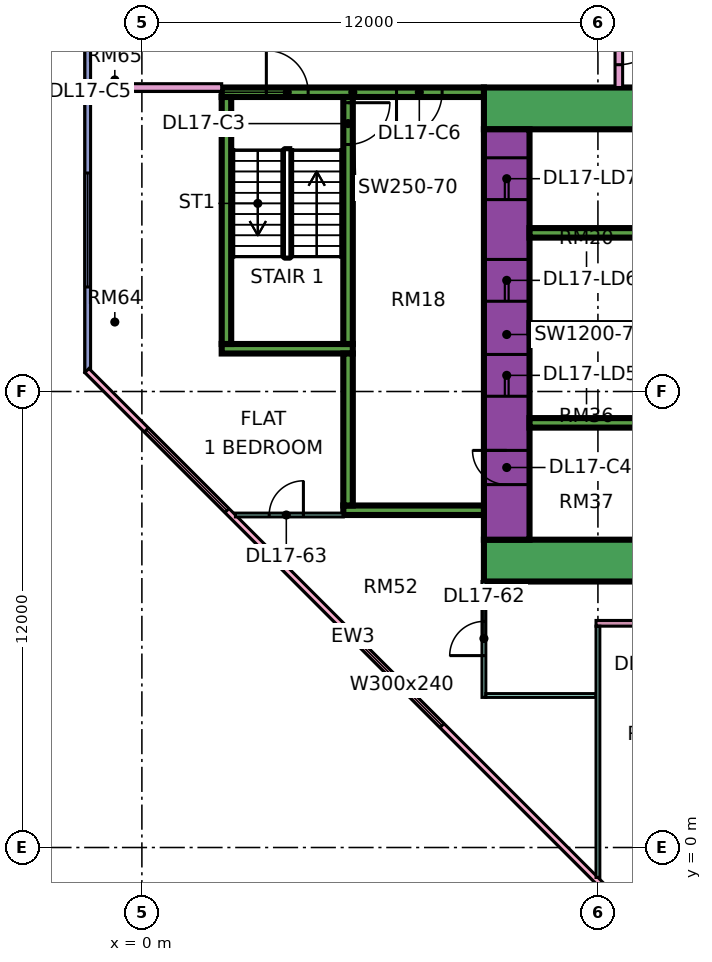
"""IFC4 building model, lengths in metres.
Left out: names, types, materials, properties, quantities, classifications, styles, units other than length and angle.
Written with IfcOpenShell. Run it as: python <this file> out.ifc"""

import sys

from ifc_helpers import new_model, si_unit, direction, frame, frame_2d, origin, place, context, subcontext, project, spatial, rectangle, extrude, element, fill, save


model = new_model("IFC4")
c1 = context("Model", 3, precision=1e-05, world=origin(), true_north=direction((0.0, 1.0)))
c2 = subcontext(c1, "Body", "Model", "MODEL_VIEW")
j1 = project(units=[si_unit("LENGTHUNIT", "METRE"), si_unit("PLANEANGLEUNIT", "RADIAN")], contexts=[c1])
p1 = place(None, origin())
s1 = spatial("IfcSite", under=j1, at=p1, CompositionType="ELEMENT")
p2 = place(p1, origin())
s2 = spatial("IfcBuilding", under=s1, at=p2, CompositionType="ELEMENT")
p3 = place(p2, frame((0.0, 0.0, 78.9)))
s3 = spatial("IfcBuildingStorey", under=s2, at=p3, CompositionType="ELEMENT", Elevation=78.9)
p4 = place(p3, frame((9.0, 7.55, 0.0), z_axis=(0.0, 0.0, 1.0), x_axis=(1.0, 0.0, 0.0)))
e1 = element("IfcWall", 1, at=p4, inside=s3, PredefinedType="SHEAR", context=c2, shape_type="SweptSolid", body=[
    extrude(rectangle(XDim=25.0, YDim=1.1, at=frame_2d((12.5, 0.0))), origin(), (0.0, 0.0, 1.0), 3.75),
])
p5 = place(p3, frame((9.0, 19.45, 0.0), z_axis=(0.0, 0.0, 1.0), x_axis=(1.0, 0.0, 0.0)))
e2 = element("IfcWall", 2, at=p5, inside=s3, PredefinedType="SHEAR", context=c2, shape_type="SweptSolid", body=[
    extrude(rectangle(XDim=25.0, YDim=1.1, at=frame_2d((12.5, 0.0))), origin(), (0.0, 0.0, 1.0), 3.75),
])
p6 = place(p5, frame((19.1, 0.0, 0.0)))
e3 = element("IfcOpeningElement", 3, at=p6, cuts=e2, PredefinedType="OPENING", context=c2, shape_type="SweptSolid", body=[
    extrude(rectangle(XDim=1.8, YDim=2.4, at=frame_2d((0.9, 1.2))), frame((0.0, 0.56, 0.0), z_axis=(0.0, -1.0, 0.0), x_axis=(1.0, 0.0, 0.0)), (0.0, 0.0, 1.0), 1.12),
])
p7 = place(p3, frame((9.6, 8.1, 0.0), z_axis=(0.0, 0.0, 1.0), x_axis=(0.0, 1.0, 0.0)))
e4 = element("IfcWall", 4, at=p7, inside=s3, PredefinedType="SHEAR", context=c2, shape_type="SweptSolid", body=[
    extrude(rectangle(XDim=10.8, YDim=1.2, at=frame_2d((5.4, 0.0))), origin(), (0.0, 0.0, 1.0), 3.75),
])
p8 = place(p7, frame((3.775, 0.0, 0.0)))
e5 = element("IfcOpeningElement", 5, at=p8, cuts=e4, PredefinedType="OPENING", context=c2, shape_type="SweptSolid", body=[
    extrude(rectangle(XDim=1.1, YDim=2.2, at=frame_2d((0.55, 1.1))), frame((0.0, 0.61, 0.0), z_axis=(0.0, -1.0, 0.0), x_axis=(1.0, 0.0, 0.0)), (0.0, 0.0, 1.0), 1.22),
])
p9 = place(p7, frame((6.275, 0.0, 0.0)))
e6 = element("IfcOpeningElement", 6, at=p9, cuts=e4, PredefinedType="OPENING", context=c2, shape_type="SweptSolid", body=[
    extrude(rectangle(XDim=1.1, YDim=2.2, at=frame_2d((0.55, 1.1))), frame((0.0, 0.61, 0.0), z_axis=(0.0, -1.0, 0.0), x_axis=(1.0, 0.0, 0.0)), (0.0, 0.0, 1.0), 1.22),
])
p10 = place(p7, frame((8.95, 0.0, 0.0)))
e7 = element("IfcOpeningElement", 7, at=p10, cuts=e4, PredefinedType="OPENING", context=c2, shape_type="SweptSolid", body=[
    extrude(rectangle(XDim=1.1, YDim=2.2, at=frame_2d((0.55, 1.1))), frame((0.0, 0.61, 0.0), z_axis=(0.0, -1.0, 0.0), x_axis=(1.0, 0.0, 0.0)), (0.0, 0.0, 1.0), 1.22),
])
p11 = place(p7, frame((1.45, 0.0, 0.0)))
e8 = element("IfcOpeningElement", 8, at=p11, cuts=e4, PredefinedType="OPENING", context=c2, shape_type="SweptSolid", body=[
    extrude(rectangle(XDim=0.9, YDim=2.1, at=frame_2d((0.45, 1.05))), frame((0.0, 0.61, 0.0), z_axis=(0.0, -1.0, 0.0), x_axis=(1.0, 0.0, 0.0)), (0.0, 0.0, 1.0), 1.22),
])
for number, where, z_axis, x_axis in (
    (9, (10.2, 11.175, 0.0), (0.0, 0.0, 1.0), (1.0, 0.0, 0.0)),
    (10, (10.2, 13.675, 0.0), (0.0, 0.0, 1.0), (1.0, 0.0, 0.0)),
    (11, (10.2, 16.175, 0.0), (0.0, 0.0, 1.0), (1.0, 0.0, 0.0)),
):
    element("IfcWall", number, at=place(p3, frame(where, z_axis=z_axis, x_axis=x_axis)), inside=s3, PredefinedType="SHEAR", context=c2, shape_type="SweptSolid", body=[
        extrude(rectangle(XDim=3.0, YDim=0.25, at=frame_2d((1.5, 0.0))), origin(), (0.0, 0.0, 1.0), 3.75),
    ])
p12 = place(p3, frame((2.1, 19.875, 0.0), z_axis=(0.0, 0.0, 1.0), x_axis=(1.0, 0.0, 0.0)))
e12 = element("IfcWall", 12, at=p12, inside=s3, PredefinedType="SHEAR", context=c2, shape_type="SweptSolid", body=[
    extrude(rectangle(XDim=6.9, YDim=0.25, at=frame_2d((3.45, 0.0))), origin(), (0.0, 0.0, 1.0), 3.75),
])
p13 = place(p12, frame((1.175, 0.0, 0.0)))
e13 = element("IfcOpeningElement", 13, at=p13, cuts=e12, PredefinedType="OPENING", context=c2, shape_type="SweptSolid", body=[
    extrude(rectangle(XDim=1.1, YDim=2.2, at=frame_2d((0.55, 1.1))), frame((0.0, 0.135, 0.0), z_axis=(0.0, -1.0, 0.0), x_axis=(1.0, 0.0, 0.0)), (0.0, 0.0, 1.0), 0.27),
])
p14 = place(p12, frame((4.6, 0.0, 0.0)))
e14 = element("IfcOpeningElement", 14, at=p14, cuts=e12, PredefinedType="OPENING", context=c2, shape_type="SweptSolid", body=[
    extrude(rectangle(XDim=1.2, YDim=2.2, at=frame_2d((0.6, 1.1))), frame((0.0, 0.135, 0.0), z_axis=(0.0, -1.0, 0.0), x_axis=(1.0, 0.0, 0.0)), (0.0, 0.0, 1.0), 0.27),
])
p15 = place(p3, frame((2.1, 13.125, 0.0), z_axis=(0.0, 0.0, 1.0), x_axis=(1.0, 0.0, 0.0)))
e15 = element("IfcWall", 15, at=p15, inside=s3, PredefinedType="SHEAR", context=c2, shape_type="SweptSolid", body=[
    extrude(rectangle(XDim=3.45, YDim=0.25, at=frame_2d((1.725, 0.0))), origin(), (0.0, 0.0, 1.0), 3.75),
])
p16 = place(p3, frame((2.225, 13.25, 0.0), z_axis=(0.0, 0.0, 1.0), x_axis=(0.0, 1.0, 0.0)))
e16 = element("IfcWall", 16, at=p16, inside=s3, PredefinedType="SHEAR", context=c2, shape_type="SweptSolid", body=[
    extrude(rectangle(XDim=6.5, YDim=0.25, at=frame_2d((3.25, 0.0))), origin(), (0.0, 0.0, 1.0), 3.75),
])
p17 = place(p3, frame((5.425, 13.25, 0.0), z_axis=(0.0, 0.0, 1.0), x_axis=(0.0, 1.0, 0.0)))
e17 = element("IfcWall", 17, at=p17, inside=s3, PredefinedType="SHEAR", context=c2, shape_type="SweptSolid", body=[
    extrude(rectangle(XDim=6.5, YDim=0.25, at=frame_2d((3.25, 0.0))), origin(), (0.0, 0.0, 1.0), 3.75),
])
p18 = place(p17, frame((5.25, 0.0, 0.0)))
e18 = element("IfcOpeningElement", 18, at=p18, cuts=e17, PredefinedType="OPENING", context=c2, shape_type="SweptSolid", body=[
    extrude(rectangle(XDim=1.1, YDim=2.2, at=frame_2d((0.55, 1.1))), frame((0.0, 0.135, 0.0), z_axis=(0.0, -1.0, 0.0), x_axis=(1.0, 0.0, 0.0)), (0.0, 0.0, 1.0), 0.27),
])
p19 = place(p3, frame((5.3, 8.875, 0.0), z_axis=(0.0, 0.0, 1.0), x_axis=(1.0, 0.0, 0.0)))
e19 = element("IfcWall", 19, at=p19, inside=s3, PredefinedType="SHEAR", context=c2, shape_type="SweptSolid", body=[
    extrude(rectangle(XDim=3.7, YDim=0.25, at=frame_2d((1.85, 0.0))), origin(), (0.0, 0.0, 1.0), 3.75),
])
p20 = place(p3, frame((5.425, 9.0, 0.0), z_axis=(0.0, 0.0, 1.0), x_axis=(0.0, 1.0, 0.0)))
e20 = element("IfcWall", 20, at=p20, inside=s3, PredefinedType="SHEAR", context=c2, shape_type="SweptSolid", body=[
    extrude(rectangle(XDim=4.0, YDim=0.25, at=frame_2d((2.0, 0.0))), origin(), (0.0, 0.0, 1.0), 3.75),
])
p21 = place(p3, frame((-1.425, 23.925, 0.0), z_axis=(0.0, 0.0, 1.0), x_axis=(0.0, -1.0, 0.0)))
e21 = element("IfcWall", 21, at=p21, inside=s3, PredefinedType="SOLIDWALL", context=c2, shape_type="SweptSolid", body=[
    extrude(rectangle(XDim=11.425, YDim=0.15, at=frame_2d((5.712, 0.0))), origin(), (0.0, 0.0, 1.0), 3.35),
])
p22 = place(p21, frame((0.312, 0.0, 0.45)))
e22 = element("IfcOpeningElement", 22, at=p22, cuts=e21, PredefinedType="OPENING", context=c2, shape_type="SweptSolid", body=[
    extrude(rectangle(XDim=0.9, YDim=2.4, at=frame_2d((0.45, 1.2))), frame((0.0, 0.085, 0.0), z_axis=(0.0, -1.0, 0.0), x_axis=(1.0, 0.0, 0.0)), (0.0, 0.0, 1.0), 0.17),
])
p23 = place(p21, frame((6.175, 0.0, 0.45)))
e23 = element("IfcOpeningElement", 23, at=p23, cuts=e21, PredefinedType="OPENING", context=c2, shape_type="SweptSolid", body=[
    extrude(rectangle(XDim=3.0, YDim=2.4, at=frame_2d((1.5, 1.2))), frame((0.0, 0.085, 0.0), z_axis=(0.0, -1.0, 0.0), x_axis=(1.0, 0.0, 0.0)), (0.0, 0.0, 1.0), 0.17),
])
p24 = place(p3, frame((-1.447, 12.553, 0.0), z_axis=(0.0, 0.0, 1.0), x_axis=(0.707106781187, -0.707106781187, 0.0)))
e24 = element("IfcWall", 24, at=p24, inside=s3, PredefinedType="SOLIDWALL", context=c2, shape_type="SweptSolid", body=[
    extrude(rectangle(XDim=19.799, YDim=0.15, at=frame_2d((9.899, 0.0))), origin(), (0.0, 0.0, 1.0), 3.35),
])
p25 = place(p24, frame((2.212, 0.0, 0.45)))
e25 = element("IfcOpeningElement", 25, at=p25, cuts=e24, PredefinedType="OPENING", context=c2, shape_type="SweptSolid", body=[
    extrude(rectangle(XDim=3.0, YDim=2.4, at=frame_2d((1.5, 1.2))), frame((0.0, 0.085, 0.0), z_axis=(0.0, -1.0, 0.0), x_axis=(1.0, 0.0, 0.0)), (0.0, 0.0, 1.0), 0.17),
])
p26 = place(p24, frame((10.216, 0.0, 0.45)))
e26 = element("IfcOpeningElement", 26, at=p26, cuts=e24, PredefinedType="OPENING", context=c2, shape_type="SweptSolid", body=[
    extrude(rectangle(XDim=3.0, YDim=2.4, at=frame_2d((1.5, 1.2))), frame((0.0, 0.085, 0.0), z_axis=(0.0, -1.0, 0.0), x_axis=(1.0, 0.0, 0.0)), (0.0, 0.0, 1.0), 0.17),
])
p27 = place(p3, frame((-1.35, 20.0, 0.0), z_axis=(0.0, 0.0, 1.0), x_axis=(1.0, 0.0, 0.0)))
e27 = element("IfcWall", 27, at=p27, inside=s3, PredefinedType="PARTITIONING", context=c2, shape_type="SweptSolid", body=[
    extrude(rectangle(XDim=3.45, YDim=0.2, at=frame_2d((1.725, 0.0))), origin(), (0.0, 0.0, 1.0), 3.35),
])
p28 = place(p3, frame((2.461, 8.75, 0.0), z_axis=(0.0, 0.0, 1.0), x_axis=(1.0, 0.0, 0.0)))
e28 = element("IfcWall", 28, at=p28, inside=s3, PredefinedType="PARTITIONING", context=c2, shape_type="SweptSolid", body=[
    extrude(rectangle(XDim=2.839, YDim=0.1, at=frame_2d((1.419, 0.0))), origin(), (0.0, 0.0, 1.0), 3.35),
])
p29 = place(p28, frame((0.889, 0.0, 0.0)))
e29 = element("IfcOpeningElement", 29, at=p29, cuts=e28, PredefinedType="OPENING", context=c2, shape_type="SweptSolid", body=[
    extrude(rectangle(XDim=0.9, YDim=2.1, at=frame_2d((0.45, 1.05))), frame((0.0, 0.06, 0.0), z_axis=(0.0, -1.0, 0.0), x_axis=(1.0, 0.0, 0.0)), (0.0, 0.0, 1.0), 0.12),
])
p30 = place(p3, frame((9.0, 3.95, 0.0), z_axis=(0.0, 0.0, 1.0), x_axis=(0.0, 1.0, 0.0)))
e30 = element("IfcWall", 30, at=p30, inside=s3, PredefinedType="PARTITIONING", context=c2, shape_type="SweptSolid", body=[
    extrude(rectangle(XDim=3.05, YDim=0.1, at=frame_2d((1.525, 0.0))), origin(), (0.0, 0.0, 1.0), 3.35),
])
p31 = place(p30, frame((1.1, 0.0, 0.0)))
e31 = element("IfcOpeningElement", 31, at=p31, cuts=e30, PredefinedType="OPENING", context=c2, shape_type="SweptSolid", body=[
    extrude(rectangle(XDim=0.9, YDim=2.1, at=frame_2d((0.45, 1.05))), frame((0.0, 0.06, 0.0), z_axis=(0.0, -1.0, 0.0), x_axis=(1.0, 0.0, 0.0)), (0.0, 0.0, 1.0), 0.12),
])
p32 = place(p3, frame((9.05, 4.0, 0.0), z_axis=(0.0, 0.0, 1.0), x_axis=(1.0, 0.0, 0.0)))
e32 = element("IfcWall", 32, at=p32, inside=s3, PredefinedType="PARTITIONING", context=c2, shape_type="SweptSolid", body=[
    extrude(rectangle(XDim=2.9, YDim=0.1, at=frame_2d((1.45, 0.0))), origin(), (0.0, 0.0, 1.0), 3.35),
])
p33 = place(p3, frame((11.95, 5.9, 0.0), z_axis=(0.0, 0.0, 1.0), x_axis=(1.0, 0.0, 0.0)))
e33 = element("IfcWall", 33, at=p33, inside=s3, PredefinedType="PARTITIONING", context=c2, shape_type="SweptSolid", body=[
    extrude(rectangle(XDim=21.1, YDim=0.15, at=frame_2d((10.55, 0.0))), origin(), (0.0, 0.0, 1.0), 3.35),
])
p34 = place(p33, frame((1.1, 0.0, 0.0)))
e34 = element("IfcOpeningElement", 34, at=p34, cuts=e33, PredefinedType="OPENING", context=c2, shape_type="SweptSolid", body=[
    extrude(rectangle(XDim=0.9, YDim=2.1, at=frame_2d((0.45, 1.05))), frame((0.0, 0.085, 0.0), z_axis=(0.0, -1.0, 0.0), x_axis=(1.0, 0.0, 0.0)), (0.0, 0.0, 1.0), 0.17),
])
p35 = place(p33, frame((7.1, 0.0, 0.0)))
e35 = element("IfcOpeningElement", 35, at=p35, cuts=e33, PredefinedType="OPENING", context=c2, shape_type="SweptSolid", body=[
    extrude(rectangle(XDim=0.9, YDim=2.1, at=frame_2d((0.45, 1.05))), frame((0.0, 0.085, 0.0), z_axis=(0.0, -1.0, 0.0), x_axis=(1.0, 0.0, 0.0)), (0.0, 0.0, 1.0), 0.17),
])
p36 = place(p33, frame((13.1, 0.0, 0.0)))
e36 = element("IfcOpeningElement", 36, at=p36, cuts=e33, PredefinedType="OPENING", context=c2, shape_type="SweptSolid", body=[
    extrude(rectangle(XDim=0.9, YDim=2.1, at=frame_2d((0.45, 1.05))), frame((0.0, 0.085, 0.0), z_axis=(0.0, -1.0, 0.0), x_axis=(1.0, 0.0, 0.0)), (0.0, 0.0, 1.0), 0.17),
])
p37 = place(p3, frame((12.0, -0.788, 0.0), z_axis=(0.0, 0.0, 1.0), x_axis=(0.0, 1.0, 0.0)))
e37 = element("IfcWall", 37, at=p37, inside=s3, PredefinedType="PARTITIONING", context=c2, shape_type="SweptSolid", body=[
    extrude(rectangle(XDim=6.613, YDim=0.1, at=frame_2d((3.306, 0.0))), origin(), (0.0, 0.0, 1.0), 3.35),
])
p38 = place(p3, frame((12.55, 20.0, 0.0), z_axis=(0.0, 0.0, 1.0), x_axis=(0.0, 1.0, 0.0)))
e38 = element("IfcWall", 38, at=p38, inside=s3, PredefinedType="PARTITIONING", context=c2, shape_type="SweptSolid", body=[
    extrude(rectangle(XDim=43.0, YDim=0.2, at=frame_2d((21.5, 0.0))), origin(), (0.0, 0.0, 1.0), 3.35),
])
p39 = place(p38, frame((16.95, 0.0, 0.0)))
e39 = element("IfcOpeningElement", 39, at=p39, cuts=e38, PredefinedType="OPENING", context=c2, shape_type="SweptSolid", body=[
    extrude(rectangle(XDim=1.0, YDim=2.1, at=frame_2d((0.5, 1.05))), frame((0.0, 0.11, 0.0), z_axis=(0.0, -1.0, 0.0), x_axis=(1.0, 0.0, 0.0)), (0.0, 0.0, 1.0), 0.22),
])
p40 = place(p38, frame((35.25, 0.0, 0.0)))
e40 = element("IfcOpeningElement", 40, at=p40, cuts=e38, PredefinedType="OPENING", context=c2, shape_type="SweptSolid", body=[
    extrude(rectangle(XDim=1.0, YDim=2.1, at=frame_2d((0.5, 1.05))), frame((0.0, 0.11, 0.0), z_axis=(0.0, -1.0, 0.0), x_axis=(1.0, 0.0, 0.0)), (0.0, 0.0, 1.0), 0.22),
])
p41 = place(p38, frame((0.6, 0.0, 0.0)))
e41 = element("IfcOpeningElement", 41, at=p41, cuts=e38, PredefinedType="OPENING", context=c2, shape_type="SweptSolid", body=[
    extrude(rectangle(XDim=1.2, YDim=2.1, at=frame_2d((0.6, 1.05))), frame((0.0, 0.11, 0.0), z_axis=(0.0, -1.0, 0.0), x_axis=(1.0, 0.0, 0.0)), (0.0, 0.0, 1.0), 0.22),
])
p42 = place(p38, frame((14.1, 0.0, 0.0)))
e42 = element("IfcOpeningElement", 42, at=p42, cuts=e38, PredefinedType="OPENING", context=c2, shape_type="SweptSolid", body=[
    extrude(rectangle(XDim=1.0, YDim=2.1, at=frame_2d((0.5, 1.05))), frame((0.0, 0.11, 0.0), z_axis=(0.0, -1.0, 0.0), x_axis=(1.0, 0.0, 0.0)), (0.0, 0.0, 1.0), 0.22),
])
p43 = place(p23, origin())
e43 = element("IfcWindow", 43, at=p43, inside=s3, PartitioningType="SINGLE_PANEL", PredefinedType="WINDOW", context=c2, shape_type="SweptSolid", body=[
    extrude(rectangle(XDim=3.0, YDim=2.4, at=frame_2d((1.5, 1.2))), frame((0.0, 0.03, 0.0), z_axis=(0.0, -1.0, 0.0), x_axis=(1.0, 0.0, 0.0)), (0.0, 0.0, 1.0), 0.06),
])
fill(e23, e43)
p44 = place(p25, origin())
e44 = element("IfcWindow", 44, at=p44, inside=s3, PartitioningType="SINGLE_PANEL", PredefinedType="WINDOW", context=c2, shape_type="SweptSolid", body=[
    extrude(rectangle(XDim=3.0, YDim=2.4, at=frame_2d((1.5, 1.2))), frame((0.0, 0.03, 0.0), z_axis=(0.0, -1.0, 0.0), x_axis=(1.0, 0.0, 0.0)), (0.0, 0.0, 1.0), 0.06),
])
fill(e25, e44)
p45 = place(p26, origin())
e45 = element("IfcWindow", 45, at=p45, inside=s3, PartitioningType="SINGLE_PANEL", PredefinedType="WINDOW", context=c2, shape_type="SweptSolid", body=[
    extrude(rectangle(XDim=3.0, YDim=2.4, at=frame_2d((1.5, 1.2))), frame((0.0, 0.03, 0.0), z_axis=(0.0, -1.0, 0.0), x_axis=(1.0, 0.0, 0.0)), (0.0, 0.0, 1.0), 0.06),
])
fill(e26, e45)
p46 = place(p8, origin())
e46 = element("IfcDoor", 46, at=p46, inside=s3, OperationType="DOUBLE_DOOR_SLIDING", PredefinedType="DOOR", context=c2, shape_type="SweptSolid", body=[
    extrude(rectangle(XDim=1.1, YDim=2.2, at=frame_2d((0.55, 1.1))), frame((0.0, 0.025, 0.0), z_axis=(0.0, -1.0, 0.0), x_axis=(1.0, 0.0, 0.0)), (0.0, 0.0, 1.0), 0.05),
])
fill(e5, e46)
p47 = place(p9, origin())
e47 = element("IfcDoor", 47, at=p47, inside=s3, OperationType="DOUBLE_DOOR_SLIDING", PredefinedType="DOOR", context=c2, shape_type="SweptSolid", body=[
    extrude(rectangle(XDim=1.1, YDim=2.2, at=frame_2d((0.55, 1.1))), frame((0.0, 0.025, 0.0), z_axis=(0.0, -1.0, 0.0), x_axis=(1.0, 0.0, 0.0)), (0.0, 0.0, 1.0), 0.05),
])
fill(e6, e47)
p48 = place(p10, origin())
e48 = element("IfcDoor", 48, at=p48, inside=s3, OperationType="DOUBLE_DOOR_SLIDING", PredefinedType="DOOR", context=c2, shape_type="SweptSolid", body=[
    extrude(rectangle(XDim=1.1, YDim=2.2, at=frame_2d((0.55, 1.1))), frame((0.0, 0.025, 0.0), z_axis=(0.0, -1.0, 0.0), x_axis=(1.0, 0.0, 0.0)), (0.0, 0.0, 1.0), 0.05),
])
fill(e7, e48)
p49 = place(p18, origin())
e49 = element("IfcDoor", 49, at=p49, inside=s3, OperationType="SINGLE_SWING_RIGHT", PredefinedType="DOOR", context=c2, shape_type="SweptSolid", body=[
    extrude(rectangle(XDim=1.1, YDim=2.2, at=frame_2d((0.55, 1.1))), frame((0.0, 0.025, 0.0), z_axis=(0.0, -1.0, 0.0), x_axis=(1.0, 0.0, 0.0)), (0.0, 0.0, 1.0), 0.05),
])
fill(e18, e49)
p50 = place(p11, frame((0.9, 0.0, 0.0), z_axis=(0.0, 0.0, 1.0), x_axis=(-1.0, 0.0, 0.0)))
e50 = element("IfcDoor", 50, at=p50, inside=s3, OperationType="SINGLE_SWING_RIGHT", PredefinedType="DOOR", context=c2, shape_type="SweptSolid", body=[
    extrude(rectangle(XDim=0.9, YDim=2.1, at=frame_2d((0.45, 1.05))), frame((0.0, 0.025, 0.0), z_axis=(0.0, -1.0, 0.0), x_axis=(1.0, 0.0, 0.0)), (0.0, 0.0, 1.0), 0.05),
])
fill(e8, e50)
p51 = place(p13, origin())
e51 = element("IfcDoor", 51, at=p51, inside=s3, OperationType="SINGLE_SWING_LEFT", PredefinedType="DOOR", context=c2, shape_type="SweptSolid", body=[
    extrude(rectangle(XDim=1.1, YDim=2.2, at=frame_2d((0.55, 1.1))), frame((0.0, 0.025, 0.0), z_axis=(0.0, -1.0, 0.0), x_axis=(1.0, 0.0, 0.0)), (0.0, 0.0, 1.0), 0.05),
])
fill(e13, e51)
p52 = place(p14, frame((1.2, 0.0, 0.0), z_axis=(0.0, 0.0, 1.0), x_axis=(-1.0, 0.0, 0.0)))
e52 = element("IfcDoor", 52, at=p52, inside=s3, OperationType="SINGLE_SWING_LEFT", PredefinedType="DOOR", context=c2, shape_type="SweptSolid", body=[
    extrude(rectangle(XDim=1.2, YDim=2.2, at=frame_2d((0.6, 1.1))), frame((0.0, 0.025, 0.0), z_axis=(0.0, -1.0, 0.0), x_axis=(1.0, 0.0, 0.0)), (0.0, 0.0, 1.0), 0.05),
])
fill(e14, e52)
p53 = place(p41, origin())
e53 = element("IfcDoor", 53, at=p53, inside=s3, OperationType="SINGLE_SWING_RIGHT", PredefinedType="DOOR", context=c2, shape_type="SweptSolid", body=[
    extrude(rectangle(XDim=1.2, YDim=2.1, at=frame_2d((0.6, 1.05))), frame((0.0, 0.025, 0.0), z_axis=(0.0, -1.0, 0.0), x_axis=(1.0, 0.0, 0.0)), (0.0, 0.0, 1.0), 0.05),
])
fill(e41, e53)
p54 = place(p31, origin())
e54 = element("IfcDoor", 54, at=p54, inside=s3, OperationType="SINGLE_SWING_LEFT", PredefinedType="DOOR", context=c2, shape_type="SweptSolid", body=[
    extrude(rectangle(XDim=0.9, YDim=2.1, at=frame_2d((0.45, 1.05))), frame((0.0, 0.025, 0.0), z_axis=(0.0, -1.0, 0.0), x_axis=(1.0, 0.0, 0.0)), (0.0, 0.0, 1.0), 0.05),
])
fill(e31, e54)
p55 = place(p29, frame((0.9, 0.0, 0.0), z_axis=(0.0, 0.0, 1.0), x_axis=(-1.0, 0.0, 0.0)))
e55 = element("IfcDoor", 55, at=p55, inside=s3, OperationType="SINGLE_SWING_RIGHT", PredefinedType="DOOR", context=c2, shape_type="SweptSolid", body=[
    extrude(rectangle(XDim=0.9, YDim=2.1, at=frame_2d((0.45, 1.05))), frame((0.0, 0.025, 0.0), z_axis=(0.0, -1.0, 0.0), x_axis=(1.0, 0.0, 0.0)), (0.0, 0.0, 1.0), 0.05),
])
fill(e29, e55)
save(model, sys.argv[1])
